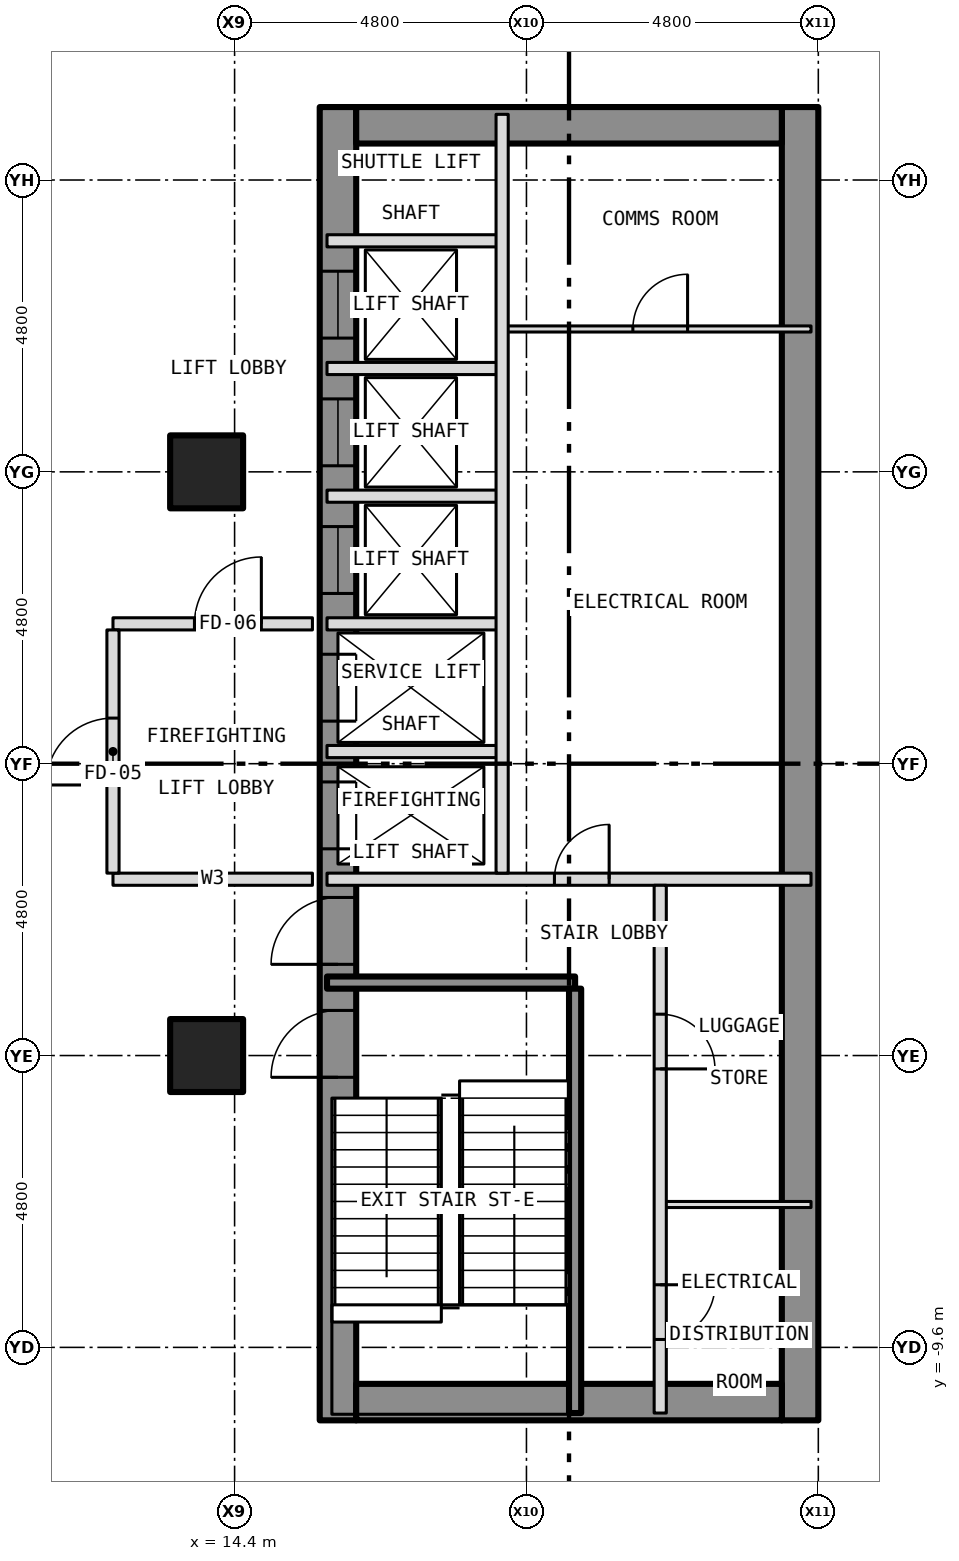
"""IFC4 building model, lengths in metres.
Left out: names, types, materials, properties, quantities, classifications, styles, units other than length and angle.
Written with IfcOpenShell. Run it as: python <this file> out.ifc"""

import sys

from ifc_helpers import new_model, si_unit, direction, frame, frame_2d, origin, origin_2d, place, context, subcontext, project, spatial, rectangle, hollow_rectangle, extrude, element, fill, save


model = new_model("IFC4")
c1 = context("Model", 3, precision=1e-05, world=origin(), true_north=direction((0.0, 1.0)))
c2 = subcontext(c1, "Body", "Model", "MODEL_VIEW")
j1 = project(units=[si_unit("LENGTHUNIT", "METRE"), si_unit("PLANEANGLEUNIT", "RADIAN")], contexts=[c1])
p1 = place(None, origin())
s1 = spatial("IfcSite", under=j1, at=p1, CompositionType="ELEMENT")
p2 = place(p1, origin())
s2 = spatial("IfcBuilding", under=s1, at=p2, CompositionType="ELEMENT")
p3 = place(p2, frame((0.0, 0.0, 29.0)))
s3 = spatial("IfcBuildingStorey", under=s2, at=p3, CompositionType="ELEMENT", Elevation=29.0)
for number, where, z_axis, x_axis in (
    (1, (13.94, -4.8, -0.2), (0.0, 0.0, 1.0), (1.0, 0.0, 0.0)),
    (2, (13.94, 4.8, -0.2), (0.0, 0.0, 1.0), (1.0, 0.0, 0.0)),
):
    element("IfcColumn", number, at=place(p3, frame(where, z_axis=z_axis, x_axis=x_axis)), inside=s3, PredefinedType="COLUMN", context=c2, shape_type="SweptSolid", body=[
        extrude(hollow_rectangle(XDim=1.2, YDim=1.2, WallThickness=0.07, at=origin_2d()), origin(), (0.0, 0.0, 1.0), 4.4),
    ])
p4 = place(p3, frame((16.1, -10.8, 0.0), z_axis=(0.0, 0.0, 1.0), x_axis=(0.0, 1.0, 0.0)))
e3 = element("IfcWall", 3, at=p4, inside=s3, PredefinedType="SHEAR", context=c2, shape_type="SweptSolid", body=[
    extrude(rectangle(XDim=21.6, YDim=0.6, at=frame_2d((10.8, 0.0))), origin(), (0.0, 0.0, 1.0), 3.9),
])
p5 = place(p4, frame((9.4, 0.0, 0.0)))
e4 = element("IfcOpeningElement", 4, at=p5, cuts=e3, PredefinedType="OPENING", context=c2, shape_type="SweptSolid", body=[
    extrude(rectangle(XDim=1.1, YDim=2.1, at=frame_2d((0.55, 1.05))), frame((0.0, 0.312, 0.0), z_axis=(0.0, -1.0, 0.0), x_axis=(1.0, 0.0, 0.0)), (0.0, 0.0, 1.0), 0.624),
])
p6 = place(p4, frame((11.5, 0.0, 0.0)))
e5 = element("IfcOpeningElement", 5, at=p6, cuts=e3, PredefinedType="OPENING", context=c2, shape_type="SweptSolid", body=[
    extrude(rectangle(XDim=1.1, YDim=2.1, at=frame_2d((0.55, 1.05))), frame((0.0, 0.312, 0.0), z_axis=(0.0, -1.0, 0.0), x_axis=(1.0, 0.0, 0.0)), (0.0, 0.0, 1.0), 0.624),
])
p7 = place(p4, frame((13.6, 0.0, 0.0)))
e6 = element("IfcOpeningElement", 6, at=p7, cuts=e3, PredefinedType="OPENING", context=c2, shape_type="SweptSolid", body=[
    extrude(rectangle(XDim=1.1, YDim=2.1, at=frame_2d((0.55, 1.05))), frame((0.0, 0.312, 0.0), z_axis=(0.0, -1.0, 0.0), x_axis=(1.0, 0.0, 0.0)), (0.0, 0.0, 1.0), 0.624),
])
p8 = place(p4, frame((15.7, 0.0, 0.0)))
e7 = element("IfcOpeningElement", 7, at=p8, cuts=e3, PredefinedType="OPENING", context=c2, shape_type="SweptSolid", body=[
    extrude(rectangle(XDim=1.1, YDim=2.1, at=frame_2d((0.55, 1.05))), frame((0.0, 0.312, 0.0), z_axis=(0.0, -1.0, 0.0), x_axis=(1.0, 0.0, 0.0)), (0.0, 0.0, 1.0), 0.624),
])
p9 = place(p4, frame((17.8, 0.0, 0.0)))
e8 = element("IfcOpeningElement", 8, at=p9, cuts=e3, PredefinedType="OPENING", context=c2, shape_type="SweptSolid", body=[
    extrude(rectangle(XDim=1.1, YDim=2.1, at=frame_2d((0.55, 1.05))), frame((0.0, 0.312, 0.0), z_axis=(0.0, -1.0, 0.0), x_axis=(1.0, 0.0, 0.0)), (0.0, 0.0, 1.0), 0.624),
])
p10 = place(p4, frame((5.642, 0.0, 0.0)))
e9 = element("IfcOpeningElement", 9, at=p10, cuts=e3, PredefinedType="OPENING", context=c2, shape_type="SweptSolid", body=[
    extrude(rectangle(XDim=1.1, YDim=2.1, at=frame_2d((0.55, 1.05))), frame((0.0, 0.312, 0.0), z_axis=(0.0, -1.0, 0.0), x_axis=(1.0, 0.0, 0.0)), (0.0, 0.0, 1.0), 0.624),
])
p11 = place(p4, frame((7.5, 0.0, 0.0)))
e10 = element("IfcOpeningElement", 10, at=p11, cuts=e3, PredefinedType="OPENING", context=c2, shape_type="SweptSolid", body=[
    extrude(rectangle(XDim=1.1, YDim=2.1, at=frame_2d((0.55, 1.05))), frame((0.0, 0.312, 0.0), z_axis=(0.0, -1.0, 0.0), x_axis=(1.0, 0.0, 0.0)), (0.0, 0.0, 1.0), 0.624),
])
p12 = place(p3, frame((23.7, -10.8, 0.0), z_axis=(0.0, 0.0, 1.0), x_axis=(0.0, 1.0, 0.0)))
e11 = element("IfcWall", 11, at=p12, inside=s3, PredefinedType="SHEAR", context=c2, shape_type="SweptSolid", body=[
    extrude(rectangle(XDim=21.6, YDim=0.6, at=frame_2d((10.8, 0.0))), origin(), (0.0, 0.0, 1.0), 3.9),
])
for number, where, z_axis, x_axis in (
    (12, (16.4, 10.5, 0.0), (0.0, 0.0, 1.0), (1.0, 0.0, 0.0)),
    (13, (16.4, -10.5, 0.0), (0.0, 0.0, 1.0), (1.0, 0.0, 0.0)),
):
    element("IfcWall", number, at=place(p3, frame(where, z_axis=z_axis, x_axis=x_axis)), inside=s3, PredefinedType="SHEAR", context=c2, shape_type="SweptSolid", body=[
        extrude(rectangle(XDim=7.0, YDim=0.6, at=frame_2d((3.5, 0.0))), origin(), (0.0, 0.0, 1.0), 3.9),
    ])
p13 = place(p3, frame((21.4, -7.25, 0.0), z_axis=(0.0, 0.0, 1.0), x_axis=(1.0, 0.0, 0.0)))
e14 = element("IfcWall", 14, at=p13, inside=s3, PredefinedType="PARTITIONING", context=c2, shape_type="SweptSolid", body=[
    extrude(rectangle(XDim=2.48, YDim=0.1, at=frame_2d((1.24, 0.0))), origin(), (0.0, 0.0, 1.0), 3.9),
])
p14 = place(p3, frame((15.92, -3.6, 0.0), z_axis=(0.0, 0.0, 1.0), x_axis=(1.0, 0.0, 0.0)))
e15 = element("IfcWall", 15, at=p14, inside=s3, PredefinedType="SHEAR", context=c2, shape_type="SweptSolid", body=[
    extrude(rectangle(XDim=4.08, YDim=0.2, at=frame_2d((2.04, 0.0))), origin(), (0.0, 0.0, 1.0), 3.9),
])
p15 = place(p3, frame((12.4, -1.9, 0.0), z_axis=(0.0, 0.0, 1.0), x_axis=(1.0, 0.0, 0.0)))
e16 = element("IfcWall", 16, at=p15, inside=s3, PredefinedType="PARTITIONING", context=c2, shape_type="SweptSolid", body=[
    extrude(rectangle(XDim=3.28, YDim=0.2, at=frame_2d((1.64, 0.0))), origin(), (0.0, 0.0, 1.0), 4.2),
])
p16 = place(p3, frame((15.92, -1.9, 0.0), z_axis=(0.0, 0.0, 1.0), x_axis=(1.0, 0.0, 0.0)))
e17 = element("IfcWall", 17, at=p16, inside=s3, PredefinedType="PARTITIONING", context=c2, shape_type="SweptSolid", body=[
    extrude(rectangle(XDim=7.96, YDim=0.2, at=frame_2d((3.98, 0.0))), origin(), (0.0, 0.0, 1.0), 3.9),
])
p17 = place(p16, frame((3.74, 0.0, 0.0)))
e18 = element("IfcOpeningElement", 18, at=p17, cuts=e17, PredefinedType="OPENING", context=c2, shape_type="SweptSolid", body=[
    extrude(rectangle(XDim=0.9, YDim=2.1, at=frame_2d((0.45, 1.05))), frame((0.0, 0.112, 0.0), z_axis=(0.0, -1.0, 0.0), x_axis=(1.0, 0.0, 0.0)), (0.0, 0.0, 1.0), 0.224),
])
p18 = place(p3, frame((15.92, 0.2, 0.0), z_axis=(0.0, 0.0, 1.0), x_axis=(1.0, 0.0, 0.0)))
e19 = element("IfcWall", 19, at=p18, inside=s3, PredefinedType="PARTITIONING", context=c2, shape_type="SweptSolid", body=[
    extrude(rectangle(XDim=2.88, YDim=0.2, at=frame_2d((1.44, 0.0))), origin(), (0.0, 0.0, 1.0), 3.9),
])
p19 = place(p3, frame((12.4, 2.3, 0.0), z_axis=(0.0, 0.0, 1.0), x_axis=(1.0, 0.0, 0.0)))
e20 = element("IfcWall", 20, at=p19, inside=s3, PredefinedType="PARTITIONING", context=c2, shape_type="SweptSolid", body=[
    extrude(rectangle(XDim=3.28, YDim=0.2, at=frame_2d((1.64, 0.0))), origin(), (0.0, 0.0, 1.0), 4.2),
])
p20 = place(p19, frame((1.34, 0.0, 0.0)))
e21 = element("IfcOpeningElement", 21, at=p20, cuts=e20, PredefinedType="OPENING", context=c2, shape_type="SweptSolid", body=[
    extrude(rectangle(XDim=1.1, YDim=2.1, at=frame_2d((0.55, 1.05))), frame((0.0, 0.112, 0.0), z_axis=(0.0, -1.0, 0.0), x_axis=(1.0, 0.0, 0.0)), (0.0, 0.0, 1.0), 0.224),
])
for number, where, z_axis, x_axis in (
    (22, (15.92, 2.3, 0.0), (0.0, 0.0, 1.0), (1.0, 0.0, 0.0)),
    (23, (15.92, 4.4, 0.0), (0.0, 0.0, 1.0), (1.0, 0.0, 0.0)),
    (24, (15.92, 6.5, 0.0), (0.0, 0.0, 1.0), (1.0, 0.0, 0.0)),
):
    element("IfcWall", number, at=place(p3, frame(where, z_axis=z_axis, x_axis=x_axis)), inside=s3, PredefinedType="PARTITIONING", context=c2, shape_type="SweptSolid", body=[
        extrude(rectangle(XDim=2.88, YDim=0.2, at=frame_2d((1.44, 0.0))), origin(), (0.0, 0.0, 1.0), 3.9),
    ])
p21 = place(p3, frame((18.8, 7.15, 0.0), z_axis=(0.0, 0.0, 1.0), x_axis=(1.0, 0.0, 0.0)))
e25 = element("IfcWall", 25, at=p21, inside=s3, PredefinedType="PARTITIONING", context=c2, shape_type="SweptSolid", body=[
    extrude(rectangle(XDim=5.08, YDim=0.1, at=frame_2d((2.54, 0.0))), origin(), (0.0, 0.0, 1.0), 3.9),
])
p22 = place(p21, frame((2.15, 0.0, 0.0)))
e26 = element("IfcOpeningElement", 26, at=p22, cuts=e25, PredefinedType="OPENING", context=c2, shape_type="SweptSolid", body=[
    extrude(rectangle(XDim=0.9, YDim=2.1, at=frame_2d((0.45, 1.05))), frame((0.0, 0.062, 0.0), z_axis=(0.0, -1.0, 0.0), x_axis=(1.0, 0.0, 0.0)), (0.0, 0.0, 1.0), 0.124),
])
p23 = place(p3, frame((15.92, 8.6, 0.0), z_axis=(0.0, 0.0, 1.0), x_axis=(1.0, 0.0, 0.0)))
e27 = element("IfcWall", 27, at=p23, inside=s3, PredefinedType="PARTITIONING", context=c2, shape_type="SweptSolid", body=[
    extrude(rectangle(XDim=2.88, YDim=0.2, at=frame_2d((1.44, 0.0))), origin(), (0.0, 0.0, 1.0), 3.9),
])
p24 = place(p3, frame((12.4, -1.8, 0.0), z_axis=(0.0, 0.0, 1.0), x_axis=(0.0, 1.0, 0.0)))
e28 = element("IfcWall", 28, at=p24, inside=s3, PredefinedType="PARTITIONING", context=c2, shape_type="SweptSolid", body=[
    extrude(rectangle(XDim=4.0, YDim=0.2, at=frame_2d((2.0, 0.0))), origin(), (0.0, 0.0, 1.0), 4.2),
])
p25 = place(p24, frame((1.45, 0.0, 0.0)))
e29 = element("IfcOpeningElement", 29, at=p25, cuts=e28, PredefinedType="OPENING", context=c2, shape_type="SweptSolid", body=[
    extrude(rectangle(XDim=1.1, YDim=2.1, at=frame_2d((0.55, 1.05))), frame((0.0, 0.112, 0.0), z_axis=(0.0, -1.0, 0.0), x_axis=(1.0, 0.0, 0.0)), (0.0, 0.0, 1.0), 0.224),
])
p26 = place(p3, frame((18.8, -1.8, 0.0), z_axis=(0.0, 0.0, 1.0), x_axis=(0.0, 1.0, 0.0)))
e30 = element("IfcWall", 30, at=p26, inside=s3, PredefinedType="PARTITIONING", context=c2, shape_type="SweptSolid", body=[
    extrude(rectangle(XDim=12.48, YDim=0.2, at=frame_2d((6.24, 0.0))), origin(), (0.0, 0.0, 1.0), 3.9),
])
p27 = place(p3, frame((20.0, -10.68, 0.0), z_axis=(0.0, 0.0, 1.0), x_axis=(0.0, 1.0, 0.0)))
e31 = element("IfcWall", 31, at=p27, inside=s3, PredefinedType="SHEAR", context=c2, shape_type="SweptSolid", body=[
    extrude(rectangle(XDim=6.98, YDim=0.2, at=frame_2d((3.49, 0.0))), origin(), (0.0, 0.0, 1.0), 3.9),
])
p28 = place(p3, frame((21.4, -10.68, 0.0), z_axis=(0.0, 0.0, 1.0), x_axis=(0.0, 1.0, 0.0)))
e32 = element("IfcWall", 32, at=p28, inside=s3, PredefinedType="PARTITIONING", context=c2, shape_type="SweptSolid", body=[
    extrude(rectangle(XDim=8.68, YDim=0.2, at=frame_2d((4.34, 0.0))), origin(), (0.0, 0.0, 1.0), 3.9),
])
p29 = place(p28, frame((1.21, 0.0, 0.0)))
e33 = element("IfcOpeningElement", 33, at=p29, cuts=e32, PredefinedType="OPENING", context=c2, shape_type="SweptSolid", body=[
    extrude(rectangle(XDim=0.9, YDim=2.1, at=frame_2d((0.45, 1.05))), frame((0.0, 0.112, 0.0), z_axis=(0.0, -1.0, 0.0), x_axis=(1.0, 0.0, 0.0)), (0.0, 0.0, 1.0), 0.224),
])
p30 = place(p28, frame((5.66, 0.0, 0.0)))
e34 = element("IfcOpeningElement", 34, at=p30, cuts=e32, PredefinedType="OPENING", context=c2, shape_type="SweptSolid", body=[
    extrude(rectangle(XDim=0.9, YDim=2.1, at=frame_2d((0.45, 1.05))), frame((0.0, 0.112, 0.0), z_axis=(0.0, -1.0, 0.0), x_axis=(1.0, 0.0, 0.0)), (0.0, 0.0, 1.0), 0.224),
])
p31 = place(p5, origin())
e35 = element("IfcDoor", 35, at=p31, inside=s3, OperationType="SLIDING_TO_LEFT", PredefinedType="DOOR", context=c2, shape_type="SweptSolid", body=[
    extrude(rectangle(XDim=1.1, YDim=2.1, at=frame_2d((0.55, 1.05))), frame((0.0, 0.025, 0.0), z_axis=(0.0, -1.0, 0.0), x_axis=(1.0, 0.0, 0.0)), (0.0, 0.0, 1.0), 0.05),
])
fill(e4, e35)
p32 = place(p6, origin())
e36 = element("IfcDoor", 36, at=p32, inside=s3, OperationType="SLIDING_TO_LEFT", PredefinedType="DOOR", context=c2, shape_type="SweptSolid", body=[
    extrude(rectangle(XDim=1.1, YDim=2.1, at=frame_2d((0.55, 1.05))), frame((0.0, 0.025, 0.0), z_axis=(0.0, -1.0, 0.0), x_axis=(1.0, 0.0, 0.0)), (0.0, 0.0, 1.0), 0.05),
])
fill(e5, e36)
p33 = place(p7, origin())
e37 = element("IfcDoor", 37, at=p33, inside=s3, OperationType="SLIDING_TO_LEFT", PredefinedType="DOOR", context=c2, shape_type="SweptSolid", body=[
    extrude(rectangle(XDim=1.1, YDim=2.1, at=frame_2d((0.55, 1.05))), frame((0.0, 0.025, 0.0), z_axis=(0.0, -1.0, 0.0), x_axis=(1.0, 0.0, 0.0)), (0.0, 0.0, 1.0), 0.05),
])
fill(e6, e37)
p34 = place(p8, origin())
e38 = element("IfcDoor", 38, at=p34, inside=s3, OperationType="SLIDING_TO_LEFT", PredefinedType="DOOR", context=c2, shape_type="SweptSolid", body=[
    extrude(rectangle(XDim=1.1, YDim=2.1, at=frame_2d((0.55, 1.05))), frame((0.0, 0.025, 0.0), z_axis=(0.0, -1.0, 0.0), x_axis=(1.0, 0.0, 0.0)), (0.0, 0.0, 1.0), 0.05),
])
fill(e7, e38)
p35 = place(p9, origin())
e39 = element("IfcDoor", 39, at=p35, inside=s3, OperationType="SLIDING_TO_LEFT", PredefinedType="DOOR", context=c2, shape_type="SweptSolid", body=[
    extrude(rectangle(XDim=1.1, YDim=2.1, at=frame_2d((0.55, 1.05))), frame((0.0, 0.025, 0.0), z_axis=(0.0, -1.0, 0.0), x_axis=(1.0, 0.0, 0.0)), (0.0, 0.0, 1.0), 0.05),
])
fill(e8, e39)
p36 = place(p10, origin())
e40 = element("IfcDoor", 40, at=p36, inside=s3, OperationType="SINGLE_SWING_LEFT", PredefinedType="DOOR", context=c2, shape_type="SweptSolid", body=[
    extrude(rectangle(XDim=1.1, YDim=2.1, at=frame_2d((0.55, 1.05))), frame((0.0, 0.025, 0.0), z_axis=(0.0, -1.0, 0.0), x_axis=(1.0, 0.0, 0.0)), (0.0, 0.0, 1.0), 0.05),
])
fill(e9, e40)
p37 = place(p11, origin())
e41 = element("IfcDoor", 41, at=p37, inside=s3, OperationType="SINGLE_SWING_LEFT", PredefinedType="DOOR", context=c2, shape_type="SweptSolid", body=[
    extrude(rectangle(XDim=1.1, YDim=2.1, at=frame_2d((0.55, 1.05))), frame((0.0, 0.025, 0.0), z_axis=(0.0, -1.0, 0.0), x_axis=(1.0, 0.0, 0.0)), (0.0, 0.0, 1.0), 0.05),
])
fill(e10, e41)
p38 = place(p29, origin())
e42 = element("IfcDoor", 42, at=p38, inside=s3, OperationType="SINGLE_SWING_RIGHT", PredefinedType="DOOR", context=c2, shape_type="SweptSolid", body=[
    extrude(rectangle(XDim=0.9, YDim=2.1, at=frame_2d((0.45, 1.05))), frame((0.0, 0.025, 0.0), z_axis=(0.0, -1.0, 0.0), x_axis=(1.0, 0.0, 0.0)), (0.0, 0.0, 1.0), 0.05),
])
fill(e33, e42)
p39 = place(p30, origin())
e43 = element("IfcDoor", 43, at=p39, inside=s3, OperationType="SINGLE_SWING_LEFT", PredefinedType="DOOR", context=c2, shape_type="SweptSolid", body=[
    extrude(rectangle(XDim=0.9, YDim=2.1, at=frame_2d((0.45, 1.05))), frame((0.0, 0.025, 0.0), z_axis=(0.0, -1.0, 0.0), x_axis=(1.0, 0.0, 0.0)), (0.0, 0.0, 1.0), 0.05),
])
fill(e34, e43)
p40 = place(p17, origin())
e44 = element("IfcDoor", 44, at=p40, inside=s3, OperationType="SINGLE_SWING_RIGHT", PredefinedType="DOOR", context=c2, shape_type="SweptSolid", body=[
    extrude(rectangle(XDim=0.9, YDim=2.1, at=frame_2d((0.45, 1.05))), frame((0.0, 0.025, 0.0), z_axis=(0.0, -1.0, 0.0), x_axis=(1.0, 0.0, 0.0)), (0.0, 0.0, 1.0), 0.05),
])
fill(e18, e44)
p41 = place(p22, origin())
e45 = element("IfcDoor", 45, at=p41, inside=s3, OperationType="SINGLE_SWING_RIGHT", PredefinedType="DOOR", context=c2, shape_type="SweptSolid", body=[
    extrude(rectangle(XDim=0.9, YDim=2.1, at=frame_2d((0.45, 1.05))), frame((0.0, 0.025, 0.0), z_axis=(0.0, -1.0, 0.0), x_axis=(1.0, 0.0, 0.0)), (0.0, 0.0, 1.0), 0.05),
])
fill(e26, e45)
p42 = place(p25, origin())
e46 = element("IfcDoor", 46, at=p42, inside=s3, OperationType="SINGLE_SWING_LEFT", PredefinedType="DOOR", context=c2, shape_type="SweptSolid", body=[
    extrude(rectangle(XDim=1.1, YDim=2.1, at=frame_2d((0.55, 1.05))), frame((0.0, 0.025, 0.0), z_axis=(0.0, -1.0, 0.0), x_axis=(1.0, 0.0, 0.0)), (0.0, 0.0, 1.0), 0.05),
])
fill(e29, e46)
p43 = place(p20, origin())
e47 = element("IfcDoor", 47, at=p43, inside=s3, OperationType="SINGLE_SWING_RIGHT", PredefinedType="DOOR", context=c2, shape_type="SweptSolid", body=[
    extrude(rectangle(XDim=1.1, YDim=2.1, at=frame_2d((0.55, 1.05))), frame((0.0, 0.025, 0.0), z_axis=(0.0, -1.0, 0.0), x_axis=(1.0, 0.0, 0.0)), (0.0, 0.0, 1.0), 0.05),
])
fill(e21, e47)
save(model, sys.argv[1])
